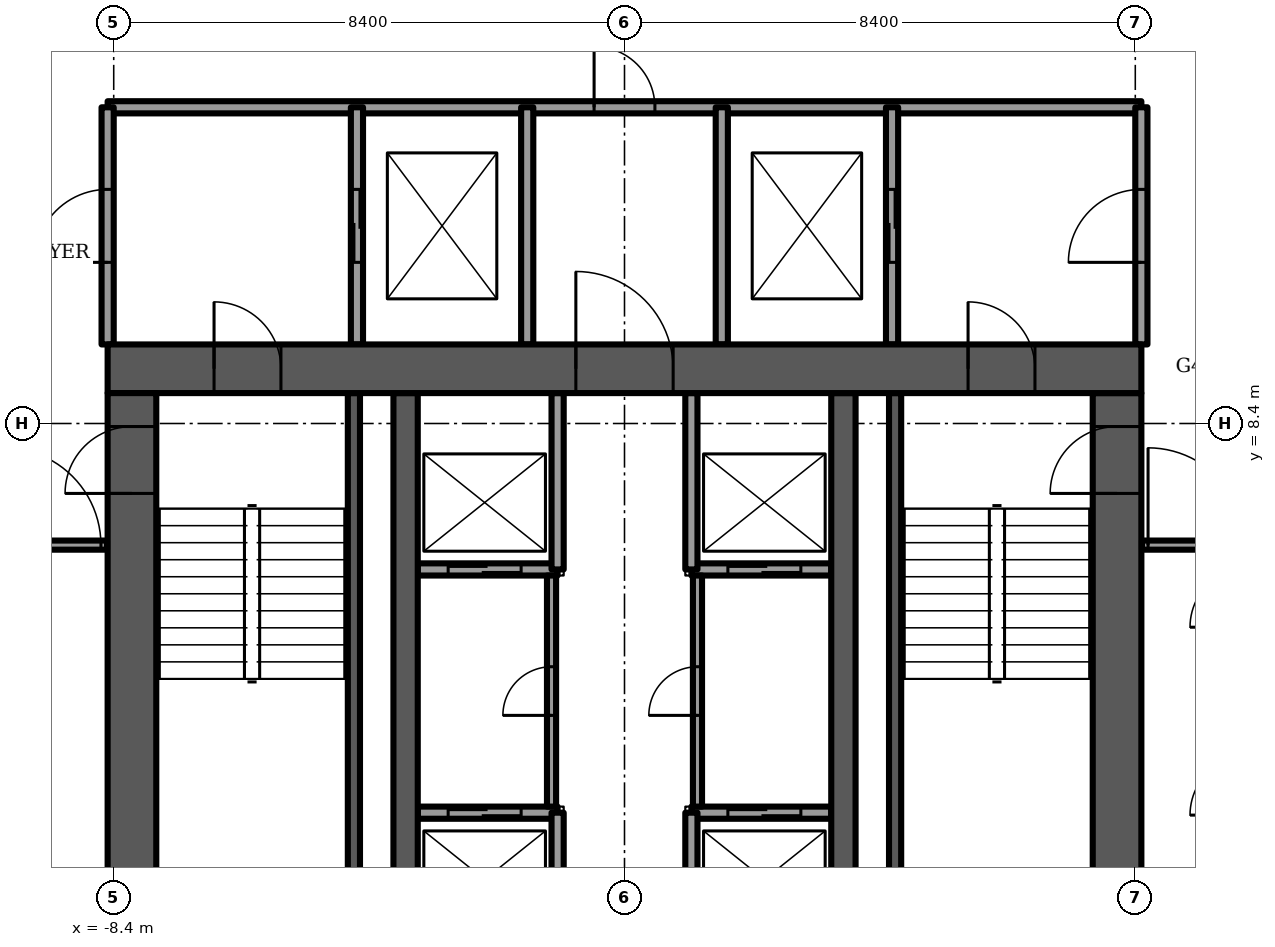
"""IFC4 building model, lengths in metres.
Left out: names, types, materials, properties, quantities, classifications, styles, units other than length and angle.
Written with IfcOpenShell. Run it as: python <this file> out.ifc"""

import sys

from ifc_helpers import new_model, si_unit, direction, frame, frame_2d, origin, place, context, subcontext, project, spatial, rectangle, extrude, element, fill, save


model = new_model("IFC4")
c1 = context("Model", 3, precision=1e-05, world=origin(), true_north=direction((0.0, 1.0)))
c2 = subcontext(c1, "Body", "Model", "MODEL_VIEW")
j1 = project(units=[si_unit("LENGTHUNIT", "METRE"), si_unit("PLANEANGLEUNIT", "RADIAN")], contexts=[c1])
p1 = place(None, origin())
s1 = spatial("IfcSite", under=j1, at=p1, CompositionType="ELEMENT")
p2 = place(p1, origin())
s2 = spatial("IfcBuilding", under=s1, at=p2, CompositionType="ELEMENT")
p3 = place(p2, frame((0.0, 0.0, 194.5)))
s3 = spatial("IfcBuildingStorey", under=s2, at=p3, CompositionType="ELEMENT", Elevation=194.5)
p4 = place(p3, frame((-8.5, 9.3, -0.3), z_axis=(0.0, 0.0, 1.0), x_axis=(1.0, 0.0, 0.0)))
e1 = element("IfcWall", 1, at=p4, inside=s3, PredefinedType="SHEAR", context=c2, shape_type="SweptSolid", body=[
    extrude(rectangle(XDim=17.0, YDim=0.8, at=frame_2d((8.5, 0.0))), origin(), (0.0, 0.0, 1.0), 3.75),
])
p5 = place(p4, frame((7.7, 0.0, 0.0)))
e2 = element("IfcOpeningElement", 2, at=p5, cuts=e1, PredefinedType="OPENING", context=c2, shape_type="SweptSolid", body=[
    extrude(rectangle(XDim=1.6, YDim=2.1, at=frame_2d((0.8, 1.05))), frame((0.0, 0.4, 0.0), z_axis=(0.0, -1.0, 0.0), x_axis=(1.0, 0.0, 0.0)), (0.0, 0.0, 1.0), 0.8),
])
p6 = place(p4, frame((1.75, 0.0, 0.0)))
e3 = element("IfcOpeningElement", 3, at=p6, cuts=e1, PredefinedType="OPENING", context=c2, shape_type="SweptSolid", body=[
    extrude(rectangle(XDim=1.1, YDim=2.1, at=frame_2d((0.55, 1.05))), frame((0.0, 0.4, 0.0), z_axis=(0.0, -1.0, 0.0), x_axis=(1.0, 0.0, 0.0)), (0.0, 0.0, 1.0), 0.8),
])
p7 = place(p4, frame((14.15, 0.0, 0.0)))
e4 = element("IfcOpeningElement", 4, at=p7, cuts=e1, PredefinedType="OPENING", context=c2, shape_type="SweptSolid", body=[
    extrude(rectangle(XDim=1.1, YDim=2.1, at=frame_2d((0.55, 1.05))), frame((0.0, 0.4, 0.0), z_axis=(0.0, -1.0, 0.0), x_axis=(1.0, 0.0, 0.0)), (0.0, 0.0, 1.0), 0.8),
])
p8 = place(p3, frame((-8.1, -0.9, -0.3), z_axis=(0.0, 0.0, 1.0), x_axis=(0.0, 1.0, 0.0)))
e5 = element("IfcWall", 5, at=p8, inside=s3, PredefinedType="SHEAR", context=c2, shape_type="SweptSolid", body=[
    extrude(rectangle(XDim=9.8, YDim=0.8, at=frame_2d((4.9, 0.0))), origin(), (0.0, 0.0, 1.0), 3.75),
])
p9 = place(p8, frame((8.15, 0.0, 0.0)))
e6 = element("IfcOpeningElement", 6, at=p9, cuts=e5, PredefinedType="OPENING", context=c2, shape_type="SweptSolid", body=[
    extrude(rectangle(XDim=1.1, YDim=2.1, at=frame_2d((0.55, 1.05))), frame((0.0, 0.4, 0.0), z_axis=(0.0, -1.0, 0.0), x_axis=(1.0, 0.0, 0.0)), (0.0, 0.0, 1.0), 0.8),
])
p10 = place(p3, frame((8.1, -0.9, -0.3), z_axis=(0.0, 0.0, 1.0), x_axis=(0.0, 1.0, 0.0)))
e7 = element("IfcWall", 7, at=p10, inside=s3, PredefinedType="SHEAR", context=c2, shape_type="SweptSolid", body=[
    extrude(rectangle(XDim=9.8, YDim=0.8, at=frame_2d((4.9, 0.0))), origin(), (0.0, 0.0, 1.0), 3.75),
])
p11 = place(p10, frame((8.15, 0.0, 0.0)))
e8 = element("IfcOpeningElement", 8, at=p11, cuts=e7, PredefinedType="OPENING", context=c2, shape_type="SweptSolid", body=[
    extrude(rectangle(XDim=1.1, YDim=2.1, at=frame_2d((0.55, 1.05))), frame((0.0, 0.4, 0.0), z_axis=(0.0, -1.0, 0.0), x_axis=(1.0, 0.0, 0.0)), (0.0, 0.0, 1.0), 0.8),
])
for number, where, z_axis, x_axis in (
    (9, (-3.6, -0.9, -0.3), (0.0, 0.0, 1.0), (0.0, 1.0, 0.0)),
    (10, (3.6, -0.9, -0.3), (0.0, 0.0, 1.0), (0.0, 1.0, 0.0)),
):
    element("IfcWall", number, at=place(p3, frame(where, z_axis=z_axis, x_axis=x_axis)), inside=s3, PredefinedType="SHEAR", context=c2, shape_type="SweptSolid", body=[
        extrude(rectangle(XDim=9.8, YDim=0.4, at=frame_2d((4.9, 0.0))), origin(), (0.0, 0.0, 1.0), 3.75),
    ])
for number, where, z_axis, x_axis in (
    (11, (-9.77, 17.88, 0.0), (0.0, 0.0, 1.0), (-0.5, -0.866, 0.0)),
    (12, (13.025, 12.241, 0.0), (0.0, 0.0, 1.0), (-0.5, 0.866, 0.0)),
):
    element("IfcWall", number, at=place(p3, frame(where, z_axis=z_axis, x_axis=x_axis)), inside=s3, PredefinedType="PARAPET", context=c2, shape_type="SweptSolid", body=[
        extrude(rectangle(XDim=6.512, YDim=0.9, at=frame_2d((3.256, 0.0))), origin(), (0.0, 0.0, 1.0), 1.1),
    ])
p12 = place(p3, frame((-3.4, 2.0, 0.0), z_axis=(0.0, 0.0, 1.0), x_axis=(1.0, 0.0, 0.0)))
e13 = element("IfcWall", 13, at=p12, inside=s3, PredefinedType="PARTITIONING", context=c2, shape_type="SweptSolid", body=[
    extrude(rectangle(XDim=2.3, YDim=0.2, at=frame_2d((1.15, 0.0))), origin(), (0.0, 0.0, 1.0), 3.45),
])
p13 = place(p12, frame((0.5, 0.0, 0.0)))
e14 = element("IfcOpeningElement", 14, at=p13, cuts=e13, PredefinedType="OPENING", context=c2, shape_type="SweptSolid", body=[
    extrude(rectangle(XDim=1.2, YDim=2.1, at=frame_2d((0.6, 1.05))), frame((0.0, 0.1, 0.0), z_axis=(0.0, -1.0, 0.0), x_axis=(1.0, 0.0, 0.0)), (0.0, 0.0, 1.0), 0.2),
])
p14 = place(p3, frame((-3.4, 6.0, 0.0), z_axis=(0.0, 0.0, 1.0), x_axis=(1.0, 0.0, 0.0)))
e15 = element("IfcWall", 15, at=p14, inside=s3, PredefinedType="PARTITIONING", context=c2, shape_type="SweptSolid", body=[
    extrude(rectangle(XDim=2.3, YDim=0.2, at=frame_2d((1.15, 0.0))), origin(), (0.0, 0.0, 1.0), 3.45),
])
p15 = place(p14, frame((0.5, 0.0, 0.0)))
e16 = element("IfcOpeningElement", 16, at=p15, cuts=e15, PredefinedType="OPENING", context=c2, shape_type="SweptSolid", body=[
    extrude(rectangle(XDim=1.2, YDim=2.1, at=frame_2d((0.6, 1.05))), frame((0.0, 0.1, 0.0), z_axis=(0.0, -1.0, 0.0), x_axis=(1.0, 0.0, 0.0)), (0.0, 0.0, 1.0), 0.2),
])
p16 = place(p3, frame((1.1, 2.0, 0.0), z_axis=(0.0, 0.0, 1.0), x_axis=(1.0, 0.0, 0.0)))
e17 = element("IfcWall", 17, at=p16, inside=s3, PredefinedType="PARTITIONING", context=c2, shape_type="SweptSolid", body=[
    extrude(rectangle(XDim=2.3, YDim=0.2, at=frame_2d((1.15, 0.0))), origin(), (0.0, 0.0, 1.0), 3.45),
])
p17 = place(p16, frame((0.6, 0.0, 0.0)))
e18 = element("IfcOpeningElement", 18, at=p17, cuts=e17, PredefinedType="OPENING", context=c2, shape_type="SweptSolid", body=[
    extrude(rectangle(XDim=1.2, YDim=2.1, at=frame_2d((0.6, 1.05))), frame((0.0, 0.1, 0.0), z_axis=(0.0, -1.0, 0.0), x_axis=(1.0, 0.0, 0.0)), (0.0, 0.0, 1.0), 0.2),
])
p18 = place(p3, frame((1.1, 6.0, 0.0), z_axis=(0.0, 0.0, 1.0), x_axis=(1.0, 0.0, 0.0)))
e19 = element("IfcWall", 19, at=p18, inside=s3, PredefinedType="PARTITIONING", context=c2, shape_type="SweptSolid", body=[
    extrude(rectangle(XDim=2.3, YDim=0.2, at=frame_2d((1.15, 0.0))), origin(), (0.0, 0.0, 1.0), 3.45),
])
p19 = place(p18, frame((0.6, 0.0, 0.0)))
e20 = element("IfcOpeningElement", 20, at=p19, cuts=e19, PredefinedType="OPENING", context=c2, shape_type="SweptSolid", body=[
    extrude(rectangle(XDim=1.2, YDim=2.1, at=frame_2d((0.6, 1.05))), frame((0.0, 0.1, 0.0), z_axis=(0.0, -1.0, 0.0), x_axis=(1.0, 0.0, 0.0)), (0.0, 0.0, 1.0), 0.2),
])
for number, where, z_axis, x_axis in (
    (21, (-1.1, -0.9, 0.0), (0.0, 0.0, 1.0), (0.0, 1.0, 0.0)),
    (22, (1.1, -0.9, 0.0), (0.0, 0.0, 1.0), (0.0, 1.0, 0.0)),
    (23, (-1.1, 6.0, 0.0), (0.0, 0.0, 1.0), (0.0, 1.0, 0.0)),
    (24, (1.1, 6.0, 0.0), (0.0, 0.0, 1.0), (0.0, 1.0, 0.0)),
):
    element("IfcWall", number, at=place(p3, frame(where, z_axis=z_axis, x_axis=x_axis)), inside=s3, PredefinedType="PARTITIONING", context=c2, shape_type="SweptSolid", body=[
        extrude(rectangle(XDim=2.9, YDim=0.2, at=frame_2d((1.45, 0.0))), origin(), (0.0, 0.0, 1.0), 3.45),
    ])
for number, where, z_axis, x_axis in (
    (25, (-4.45, 0.9, -0.3), (0.0, 0.0, 1.0), (0.0, 1.0, 0.0)),
    (26, (4.45, 0.9, -0.3), (0.0, 0.0, 1.0), (0.0, 1.0, 0.0)),
):
    element("IfcWall", number, at=place(p3, frame(where, z_axis=z_axis, x_axis=x_axis)), inside=s3, PredefinedType="SOLIDWALL", context=c2, shape_type="SweptSolid", body=[
        extrude(rectangle(XDim=8.0, YDim=0.2, at=frame_2d((4.0, 0.0))), origin(), (0.0, 0.0, 1.0), 3.75),
    ])
p20 = place(p3, frame((-8.5, 13.6, 0.0), z_axis=(0.0, 0.0, 1.0), x_axis=(1.0, 0.0, 0.0)))
e27 = element("IfcWall", 27, at=p20, inside=s3, PredefinedType="PARTITIONING", context=c2, shape_type="SweptSolid", body=[
    extrude(rectangle(XDim=17.0, YDim=0.2, at=frame_2d((8.5, 0.0))), origin(), (0.0, 0.0, 1.0), 3.45),
])
p21 = place(p20, frame((8.0, 0.0, 0.0)))
e28 = element("IfcOpeningElement", 28, at=p21, cuts=e27, PredefinedType="OPENING", context=c2, shape_type="SweptSolid", body=[
    extrude(rectangle(XDim=1.0, YDim=2.1, at=frame_2d((0.5, 1.05))), frame((0.0, 0.1, 0.0), z_axis=(0.0, -1.0, 0.0), x_axis=(1.0, 0.0, 0.0)), (0.0, 0.0, 1.0), 0.2),
])
p22 = place(p3, frame((-8.5, 9.7, 0.0), z_axis=(0.0, 0.0, 1.0), x_axis=(0.0, 1.0, 0.0)))
e29 = element("IfcWall", 29, at=p22, inside=s3, PredefinedType="PARTITIONING", context=c2, shape_type="SweptSolid", body=[
    extrude(rectangle(XDim=3.9, YDim=0.2, at=frame_2d((1.95, 0.0))), origin(), (0.0, 0.0, 1.0), 3.45),
])
p23 = place(p22, frame((1.35, 0.0, 0.0)))
e30 = element("IfcOpeningElement", 30, at=p23, cuts=e29, PredefinedType="OPENING", context=c2, shape_type="SweptSolid", body=[
    extrude(rectangle(XDim=1.2, YDim=2.1, at=frame_2d((0.6, 1.05))), frame((0.0, 0.1, 0.0), z_axis=(0.0, -1.0, 0.0), x_axis=(1.0, 0.0, 0.0)), (0.0, 0.0, 1.0), 0.2),
])
p24 = place(p3, frame((8.5, 9.7, 0.0), z_axis=(0.0, 0.0, 1.0), x_axis=(0.0, 1.0, 0.0)))
e31 = element("IfcWall", 31, at=p24, inside=s3, PredefinedType="PARTITIONING", context=c2, shape_type="SweptSolid", body=[
    extrude(rectangle(XDim=3.9, YDim=0.2, at=frame_2d((1.95, 0.0))), origin(), (0.0, 0.0, 1.0), 3.45),
])
p25 = place(p24, frame((1.35, 0.0, 0.0)))
e32 = element("IfcOpeningElement", 32, at=p25, cuts=e31, PredefinedType="OPENING", context=c2, shape_type="SweptSolid", body=[
    extrude(rectangle(XDim=1.2, YDim=2.1, at=frame_2d((0.6, 1.05))), frame((0.0, 0.1, 0.0), z_axis=(0.0, -1.0, 0.0), x_axis=(1.0, 0.0, 0.0)), (0.0, 0.0, 1.0), 0.2),
])
p26 = place(p3, frame((-4.4, 9.7, 0.0), z_axis=(0.0, 0.0, 1.0), x_axis=(0.0, 1.0, 0.0)))
e33 = element("IfcWall", 33, at=p26, inside=s3, PredefinedType="PARTITIONING", context=c2, shape_type="SweptSolid", body=[
    extrude(rectangle(XDim=3.9, YDim=0.2, at=frame_2d((1.95, 0.0))), origin(), (0.0, 0.0, 1.0), 3.45),
])
p27 = place(p26, frame((1.35, 0.0, 0.0)))
e34 = element("IfcOpeningElement", 34, at=p27, cuts=e33, PredefinedType="OPENING", context=c2, shape_type="SweptSolid", body=[
    extrude(rectangle(XDim=1.2, YDim=2.1, at=frame_2d((0.6, 1.05))), frame((0.0, 0.1, 0.0), z_axis=(0.0, -1.0, 0.0), x_axis=(1.0, 0.0, 0.0)), (0.0, 0.0, 1.0), 0.2),
])
p28 = place(p3, frame((4.4, 9.7, 0.0), z_axis=(0.0, 0.0, 1.0), x_axis=(0.0, 1.0, 0.0)))
e35 = element("IfcWall", 35, at=p28, inside=s3, PredefinedType="PARTITIONING", context=c2, shape_type="SweptSolid", body=[
    extrude(rectangle(XDim=3.9, YDim=0.2, at=frame_2d((1.95, 0.0))), origin(), (0.0, 0.0, 1.0), 3.45),
])
p29 = place(p28, frame((1.35, 0.0, 0.0)))
e36 = element("IfcOpeningElement", 36, at=p29, cuts=e35, PredefinedType="OPENING", context=c2, shape_type="SweptSolid", body=[
    extrude(rectangle(XDim=1.2, YDim=2.1, at=frame_2d((0.6, 1.05))), frame((0.0, 0.1, 0.0), z_axis=(0.0, -1.0, 0.0), x_axis=(1.0, 0.0, 0.0)), (0.0, 0.0, 1.0), 0.2),
])
for number, where, z_axis, x_axis in (
    (37, (-1.6, 9.7, 0.0), (0.0, 0.0, 1.0), (0.0, 1.0, 0.0)),
    (38, (1.6, 9.7, 0.0), (0.0, 0.0, 1.0), (0.0, 1.0, 0.0)),
):
    element("IfcWall", number, at=place(p3, frame(where, z_axis=z_axis, x_axis=x_axis)), inside=s3, PredefinedType="PARTITIONING", context=c2, shape_type="SweptSolid", body=[
        extrude(rectangle(XDim=3.9, YDim=0.2, at=frame_2d((1.95, 0.0))), origin(), (0.0, 0.0, 1.0), 3.45),
    ])
p30 = place(p3, frame((-1.2, 2.1, 0.0), z_axis=(0.0, 0.0, 1.0), x_axis=(0.0, 1.0, 0.0)))
e39 = element("IfcWall", 39, at=p30, inside=s3, PredefinedType="PARTITIONING", context=c2, shape_type="SweptSolid", body=[
    extrude(rectangle(XDim=3.8, YDim=0.15, at=frame_2d((1.9, 0.0))), origin(), (0.0, 0.0, 1.0), 3.45),
])
p31 = place(p30, frame((1.5, 0.0, 0.0)))
e40 = element("IfcOpeningElement", 40, at=p31, cuts=e39, PredefinedType="OPENING", context=c2, shape_type="SweptSolid", body=[
    extrude(rectangle(XDim=0.8, YDim=2.1, at=frame_2d((0.4, 1.05))), frame((0.0, 0.075, 0.0), z_axis=(0.0, -1.0, 0.0), x_axis=(1.0, 0.0, 0.0)), (0.0, 0.0, 1.0), 0.15),
])
p32 = place(p3, frame((1.2, 2.1, 0.0), z_axis=(0.0, 0.0, 1.0), x_axis=(0.0, 1.0, 0.0)))
e41 = element("IfcWall", 41, at=p32, inside=s3, PredefinedType="PARTITIONING", context=c2, shape_type="SweptSolid", body=[
    extrude(rectangle(XDim=3.8, YDim=0.15, at=frame_2d((1.9, 0.0))), origin(), (0.0, 0.0, 1.0), 3.45),
])
p33 = place(p32, frame((1.5, 0.0, 0.0)))
e42 = element("IfcOpeningElement", 42, at=p33, cuts=e41, PredefinedType="OPENING", context=c2, shape_type="SweptSolid", body=[
    extrude(rectangle(XDim=0.8, YDim=2.1, at=frame_2d((0.4, 1.05))), frame((0.0, 0.075, 0.0), z_axis=(0.0, -1.0, 0.0), x_axis=(1.0, 0.0, 0.0)), (0.0, 0.0, 1.0), 0.15),
])
p34 = place(p3, frame((-11.93, 6.4, 0.0), z_axis=(0.0, 0.0, 1.0), x_axis=(1.0, 0.0, 0.0)))
e43 = element("IfcWall", 43, at=p34, inside=s3, PredefinedType="PARTITIONING", context=c2, shape_type="SweptSolid", body=[
    extrude(rectangle(XDim=3.42, YDim=0.15, at=frame_2d((1.71, 0.0))), origin(), (0.0, 0.0, 1.0), 3.45),
])
p35 = place(p34, frame((1.72, 0.0, 0.0)))
e44 = element("IfcOpeningElement", 44, at=p35, cuts=e43, PredefinedType="OPENING", context=c2, shape_type="SweptSolid", body=[
    extrude(rectangle(XDim=1.6, YDim=2.1, at=frame_2d((0.8, 1.05))), frame((0.0, 0.075, 0.0), z_axis=(0.0, -1.0, 0.0), x_axis=(1.0, 0.0, 0.0)), (0.0, 0.0, 1.0), 0.15),
])
p36 = place(p3, frame((8.51, 6.4, 0.0), z_axis=(0.0, 0.0, 1.0), x_axis=(1.0, 0.0, 0.0)))
e45 = element("IfcWall", 45, at=p36, inside=s3, PredefinedType="PARTITIONING", context=c2, shape_type="SweptSolid", body=[
    extrude(rectangle(XDim=3.42, YDim=0.15, at=frame_2d((1.71, 0.0))), origin(), (0.0, 0.0, 1.0), 3.45),
])
p37 = place(p36, frame((0.1, 0.0, 0.0)))
e46 = element("IfcOpeningElement", 46, at=p37, cuts=e45, PredefinedType="OPENING", context=c2, shape_type="SweptSolid", body=[
    extrude(rectangle(XDim=1.6, YDim=2.1, at=frame_2d((0.8, 1.05))), frame((0.0, 0.075, 0.0), z_axis=(0.0, -1.0, 0.0), x_axis=(1.0, 0.0, 0.0)), (0.0, 0.0, 1.0), 0.15),
])
p38 = place(p13, origin())
e47 = element("IfcDoor", 47, at=p38, inside=s3, OperationType="SLIDING_TO_LEFT", PredefinedType="DOOR", context=c2, shape_type="SweptSolid", body=[
    extrude(rectangle(XDim=1.2, YDim=2.1, at=frame_2d((0.6, 1.05))), frame((0.0, 0.025, 0.0), z_axis=(0.0, -1.0, 0.0), x_axis=(1.0, 0.0, 0.0)), (0.0, 0.0, 1.0), 0.05),
])
fill(e14, e47)
p39 = place(p17, origin())
e48 = element("IfcDoor", 48, at=p39, inside=s3, OperationType="SLIDING_TO_LEFT", PredefinedType="DOOR", context=c2, shape_type="SweptSolid", body=[
    extrude(rectangle(XDim=1.2, YDim=2.1, at=frame_2d((0.6, 1.05))), frame((0.0, 0.025, 0.0), z_axis=(0.0, -1.0, 0.0), x_axis=(1.0, 0.0, 0.0)), (0.0, 0.0, 1.0), 0.05),
])
fill(e18, e48)
p40 = place(p15, origin())
e49 = element("IfcDoor", 49, at=p40, inside=s3, OperationType="SLIDING_TO_LEFT", PredefinedType="DOOR", context=c2, shape_type="SweptSolid", body=[
    extrude(rectangle(XDim=1.2, YDim=2.1, at=frame_2d((0.6, 1.05))), frame((0.0, 0.025, 0.0), z_axis=(0.0, -1.0, 0.0), x_axis=(1.0, 0.0, 0.0)), (0.0, 0.0, 1.0), 0.05),
])
fill(e16, e49)
p41 = place(p19, origin())
e50 = element("IfcDoor", 50, at=p41, inside=s3, OperationType="SLIDING_TO_LEFT", PredefinedType="DOOR", context=c2, shape_type="SweptSolid", body=[
    extrude(rectangle(XDim=1.2, YDim=2.1, at=frame_2d((0.6, 1.05))), frame((0.0, 0.025, 0.0), z_axis=(0.0, -1.0, 0.0), x_axis=(1.0, 0.0, 0.0)), (0.0, 0.0, 1.0), 0.05),
])
fill(e20, e50)
p42 = place(p5, origin())
e51 = element("IfcDoor", 51, at=p42, inside=s3, OperationType="DOUBLE_DOOR_SINGLE_SWING", PredefinedType="DOOR", context=c2, shape_type="SweptSolid", body=[
    extrude(rectangle(XDim=1.6, YDim=2.1, at=frame_2d((0.8, 1.05))), frame((0.0, 0.025, 0.0), z_axis=(0.0, -1.0, 0.0), x_axis=(1.0, 0.0, 0.0)), (0.0, 0.0, 1.0), 0.05),
])
fill(e2, e51)
p43 = place(p6, origin())
e52 = element("IfcDoor", 52, at=p43, inside=s3, OperationType="SINGLE_SWING_LEFT", PredefinedType="DOOR", context=c2, shape_type="SweptSolid", body=[
    extrude(rectangle(XDim=1.1, YDim=2.1, at=frame_2d((0.55, 1.05))), frame((0.0, 0.025, 0.0), z_axis=(0.0, -1.0, 0.0), x_axis=(1.0, 0.0, 0.0)), (0.0, 0.0, 1.0), 0.05),
])
fill(e3, e52)
p44 = place(p9, origin())
e53 = element("IfcDoor", 53, at=p44, inside=s3, OperationType="SINGLE_SWING_RIGHT", PredefinedType="DOOR", context=c2, shape_type="SweptSolid", body=[
    extrude(rectangle(XDim=1.1, YDim=2.1, at=frame_2d((0.55, 1.05))), frame((0.0, 0.025, 0.0), z_axis=(0.0, -1.0, 0.0), x_axis=(1.0, 0.0, 0.0)), (0.0, 0.0, 1.0), 0.05),
])
fill(e6, e53)
p45 = place(p7, origin())
e54 = element("IfcDoor", 54, at=p45, inside=s3, OperationType="SINGLE_SWING_RIGHT", PredefinedType="DOOR", context=c2, shape_type="SweptSolid", body=[
    extrude(rectangle(XDim=1.1, YDim=2.1, at=frame_2d((0.55, 1.05))), frame((0.0, 0.025, 0.0), z_axis=(0.0, -1.0, 0.0), x_axis=(1.0, 0.0, 0.0)), (0.0, 0.0, 1.0), 0.05),
])
fill(e4, e54)
p46 = place(p11, origin())
e55 = element("IfcDoor", 55, at=p46, inside=s3, OperationType="SINGLE_SWING_LEFT", PredefinedType="DOOR", context=c2, shape_type="SweptSolid", body=[
    extrude(rectangle(XDim=1.1, YDim=2.1, at=frame_2d((0.55, 1.05))), frame((0.0, 0.025, 0.0), z_axis=(0.0, -1.0, 0.0), x_axis=(1.0, 0.0, 0.0)), (0.0, 0.0, 1.0), 0.05),
])
fill(e8, e55)
p47 = place(p27, origin())
e56 = element("IfcDoor", 56, at=p47, inside=s3, OperationType="SLIDING_TO_LEFT", PredefinedType="DOOR", context=c2, shape_type="SweptSolid", body=[
    extrude(rectangle(XDim=1.2, YDim=2.1, at=frame_2d((0.6, 1.05))), frame((0.0, 0.025, 0.0), z_axis=(0.0, -1.0, 0.0), x_axis=(1.0, 0.0, 0.0)), (0.0, 0.0, 1.0), 0.05),
])
fill(e34, e56)
p48 = place(p23, origin())
e57 = element("IfcDoor", 57, at=p48, inside=s3, OperationType="SINGLE_SWING_LEFT", PredefinedType="DOOR", context=c2, shape_type="SweptSolid", body=[
    extrude(rectangle(XDim=1.2, YDim=2.1, at=frame_2d((0.6, 1.05))), frame((0.0, 0.025, 0.0), z_axis=(0.0, -1.0, 0.0), x_axis=(1.0, 0.0, 0.0)), (0.0, 0.0, 1.0), 0.05),
])
fill(e30, e57)
p49 = place(p29, origin())
e58 = element("IfcDoor", 58, at=p49, inside=s3, OperationType="SLIDING_TO_LEFT", PredefinedType="DOOR", context=c2, shape_type="SweptSolid", body=[
    extrude(rectangle(XDim=1.2, YDim=2.1, at=frame_2d((0.6, 1.05))), frame((0.0, 0.025, 0.0), z_axis=(0.0, -1.0, 0.0), x_axis=(1.0, 0.0, 0.0)), (0.0, 0.0, 1.0), 0.05),
])
fill(e36, e58)
p50 = place(p25, origin())
e59 = element("IfcDoor", 59, at=p50, inside=s3, OperationType="SINGLE_SWING_LEFT", PredefinedType="DOOR", context=c2, shape_type="SweptSolid", body=[
    extrude(rectangle(XDim=1.2, YDim=2.1, at=frame_2d((0.6, 1.05))), frame((0.0, 0.025, 0.0), z_axis=(0.0, -1.0, 0.0), x_axis=(1.0, 0.0, 0.0)), (0.0, 0.0, 1.0), 0.05),
])
fill(e32, e59)
p51 = place(p21, origin())
e60 = element("IfcDoor", 60, at=p51, inside=s3, OperationType="SINGLE_SWING_LEFT", PredefinedType="DOOR", context=c2, shape_type="SweptSolid", body=[
    extrude(rectangle(XDim=1.0, YDim=2.1, at=frame_2d((0.5, 1.05))), frame((0.0, 0.025, 0.0), z_axis=(0.0, -1.0, 0.0), x_axis=(1.0, 0.0, 0.0)), (0.0, 0.0, 1.0), 0.05),
])
fill(e28, e60)
p52 = place(p31, origin())
e61 = element("IfcDoor", 61, at=p52, inside=s3, OperationType="SINGLE_SWING_LEFT", PredefinedType="DOOR", context=c2, shape_type="SweptSolid", body=[
    extrude(rectangle(XDim=0.8, YDim=2.1, at=frame_2d((0.4, 1.05))), frame((0.0, 0.025, 0.0), z_axis=(0.0, -1.0, 0.0), x_axis=(1.0, 0.0, 0.0)), (0.0, 0.0, 1.0), 0.05),
])
fill(e40, e61)
p53 = place(p33, origin())
e62 = element("IfcDoor", 62, at=p53, inside=s3, OperationType="SINGLE_SWING_RIGHT", PredefinedType="DOOR", context=c2, shape_type="SweptSolid", body=[
    extrude(rectangle(XDim=0.8, YDim=2.1, at=frame_2d((0.4, 1.05))), frame((0.0, 0.025, 0.0), z_axis=(0.0, -1.0, 0.0), x_axis=(1.0, 0.0, 0.0)), (0.0, 0.0, 1.0), 0.05),
])
fill(e42, e62)
p54 = place(p35, origin())
e63 = element("IfcDoor", 63, at=p54, inside=s3, OperationType="DOUBLE_DOOR_SINGLE_SWING", PredefinedType="DOOR", context=c2, shape_type="SweptSolid", body=[
    extrude(rectangle(XDim=1.6, YDim=2.1, at=frame_2d((0.8, 1.05))), frame((0.0, 0.025, 0.0), z_axis=(0.0, -1.0, 0.0), x_axis=(1.0, 0.0, 0.0)), (0.0, 0.0, 1.0), 0.05),
])
fill(e44, e63)
p55 = place(p37, origin())
e64 = element("IfcDoor", 64, at=p55, inside=s3, OperationType="DOUBLE_DOOR_SINGLE_SWING", PredefinedType="DOOR", context=c2, shape_type="SweptSolid", body=[
    extrude(rectangle(XDim=1.6, YDim=2.1, at=frame_2d((0.8, 1.05))), frame((0.0, 0.025, 0.0), z_axis=(0.0, -1.0, 0.0), x_axis=(1.0, 0.0, 0.0)), (0.0, 0.0, 1.0), 0.05),
])
fill(e46, e64)
save(model, sys.argv[1])
